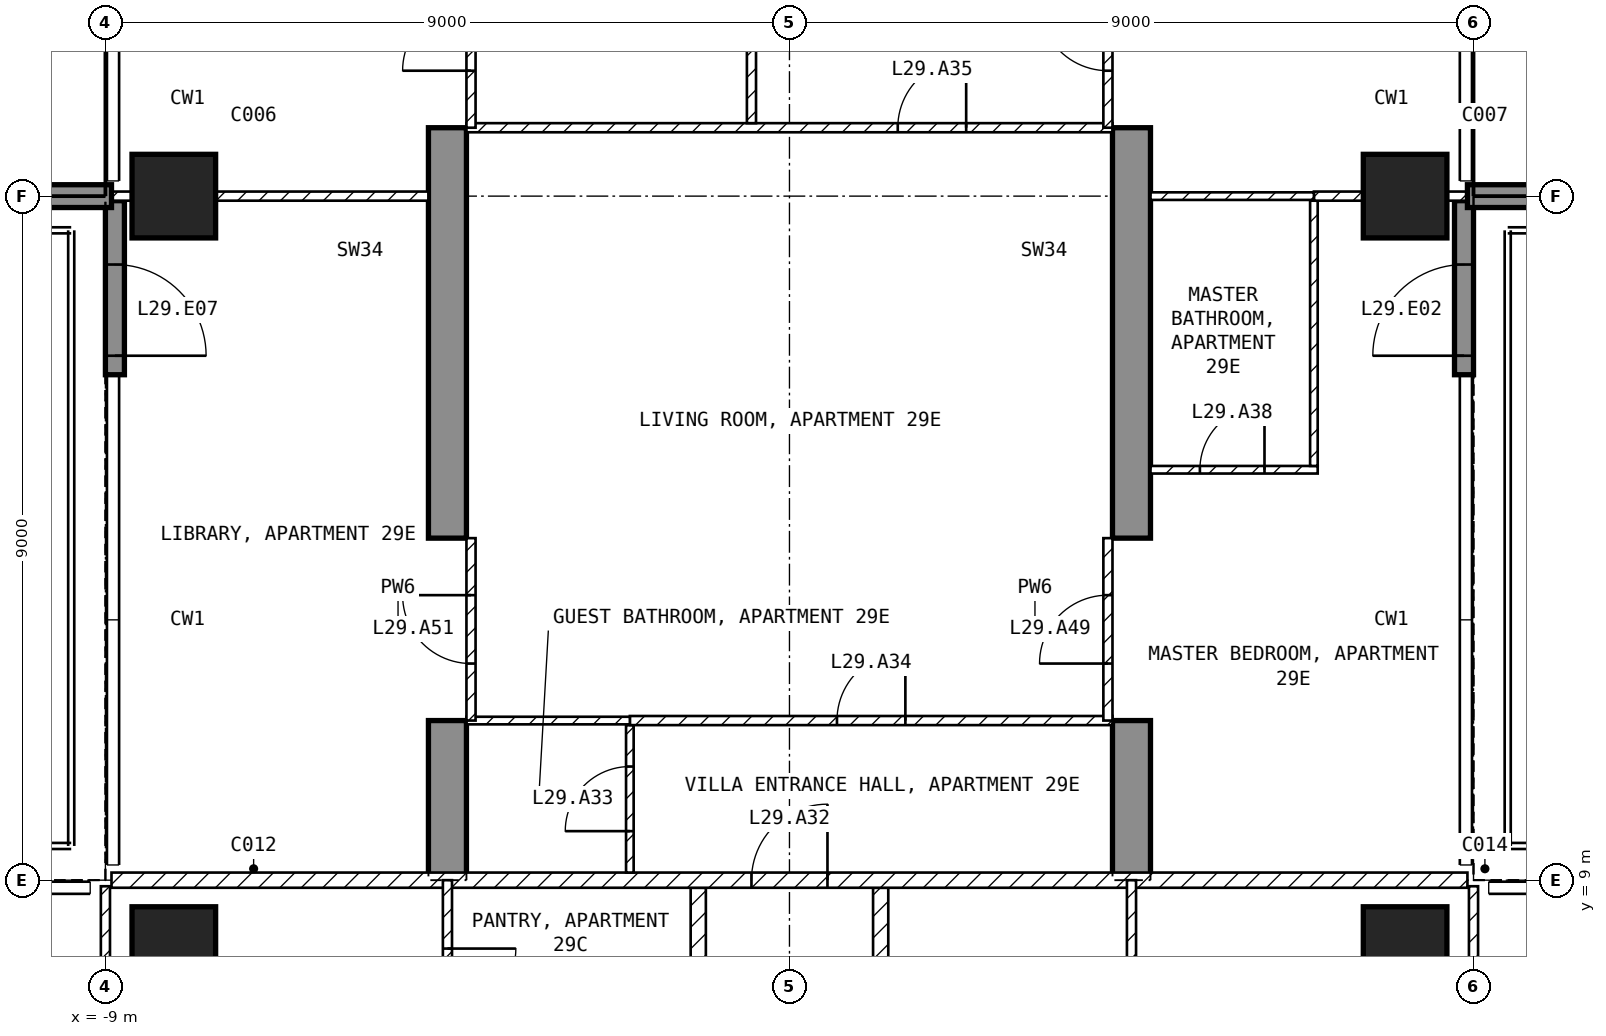
"""IFC4 building model, lengths in metres.
Left out: names, types, materials, properties, quantities, classifications, styles, units other than length and angle.
Written with IfcOpenShell. Run it as: python <this file> out.ifc"""

import sys

from ifc_helpers import new_model, si_unit, direction, frame, frame_2d, origin, origin_2d, place, context, subcontext, project, spatial, polyline, rectangle, outline, extrude, element, fill, save


model = new_model("IFC4")
c1 = context("Model", 3, precision=1e-05, world=origin(), true_north=direction((0.0, 1.0)))
c2 = subcontext(c1, "Body", "Model", "MODEL_VIEW")
j1 = project(units=[si_unit("LENGTHUNIT", "METRE"), si_unit("PLANEANGLEUNIT", "RADIAN")], contexts=[c1])
p1 = place(None, origin())
s1 = spatial("IfcSite", under=j1, at=p1, CompositionType="ELEMENT")
p2 = place(p1, origin())
s2 = spatial("IfcBuilding", under=s1, at=p2, CompositionType="ELEMENT")
p3 = place(p2, frame((0.0, 0.0, 123.4)))
s3 = spatial("IfcBuildingStorey", under=s2, at=p3, CompositionType="ELEMENT", Elevation=123.4)
for number, where, z_axis, x_axis in (
    (1, (-8.1, 8.1, -0.25), (0.0, 0.0, 1.0), (1.0, 0.0, 0.0)),
    (2, (-8.1, 18.0, -0.25), (0.0, 0.0, 1.0), (1.0, 0.0, 0.0)),
    (3, (8.1, 8.1, -0.25), (0.0, 0.0, 1.0), (1.0, 0.0, 0.0)),
    (4, (8.1, 18.0, -0.25), (0.0, 0.0, 1.0), (1.0, 0.0, 0.0)),
):
    element("IfcColumn", number, at=place(p3, frame(where, z_axis=z_axis, x_axis=x_axis)), inside=s3, PredefinedType="COLUMN", context=c2, shape_type="SweptSolid", body=[
        extrude(rectangle(XDim=1.1, YDim=1.1, at=origin_2d()), origin(), (0.0, 0.0, 1.0), 3.5),
    ])
for number, where, z_axis, x_axis in (
    (5, (-4.75, 9.0, -0.25), (1.0, 0.0, 0.0), (0.0, 1.0, 0.0)),
    (6, (4.25, 9.0, -0.25), (1.0, 0.0, 0.0), (0.0, 1.0, 0.0)),
):
    element("IfcWall", number, at=place(p3, frame(where, z_axis=z_axis, x_axis=x_axis)), inside=s3, PredefinedType="SHEAR", context=c2, shape_type="SweptSolid", body=[
        extrude(outline(polyline([(0.0, 0.0), (2.1, 0.0), (2.1, 2.65), (4.5, 2.65), (4.5, 0.0), (9.9, 0.0), (9.9, 2.65), (12.3, 2.65), (12.3, 0.0), (16.55, 0.0), (16.55, 3.5), (0.0, 3.5), (0.0, 0.0)])), origin(), (0.0, 0.0, 1.0), 0.5),
    ])
p4 = place(p3, frame((8.875, 15.65, 0.0), z_axis=(0.0, 0.0, 1.0), x_axis=(0.0, 1.0, 0.0)))
e7 = element("IfcWall", 7, at=p4, inside=s3, PredefinedType="SOLIDWALL", context=c2, shape_type="SweptSolid", body=[
    extrude(rectangle(XDim=2.29, YDim=0.25, at=frame_2d((1.145, 0.0))), origin(), (0.0, 0.0, 1.0), 3.25),
])
p5 = place(p4, frame((0.25, 0.0, 0.0)))
e8 = element("IfcOpeningElement", 8, at=p5, cuts=e7, PredefinedType="OPENING", context=c2, shape_type="SweptSolid", body=[
    extrude(rectangle(XDim=1.2, YDim=2.4, at=frame_2d((0.6, 1.2))), frame((0.0, 0.135, 0.0), z_axis=(0.0, -1.0, 0.0), x_axis=(1.0, 0.0, 0.0)), (0.0, 0.0, 1.0), 0.27),
])
p6 = place(p3, frame((-8.875, 17.94, 0.0), z_axis=(0.0, 0.0, 1.0), x_axis=(0.0, -1.0, 0.0)))
e9 = element("IfcWall", 9, at=p6, inside=s3, PredefinedType="SOLIDWALL", context=c2, shape_type="SweptSolid", body=[
    extrude(rectangle(XDim=2.29, YDim=0.25, at=frame_2d((1.145, 0.0))), origin(), (0.0, 0.0, 1.0), 3.25),
])
p7 = place(p6, frame((0.84, 0.0, 0.0)))
e10 = element("IfcOpeningElement", 10, at=p7, cuts=e9, PredefinedType="OPENING", context=c2, shape_type="SweptSolid", body=[
    extrude(rectangle(XDim=1.2, YDim=2.4, at=frame_2d((0.6, 1.2))), frame((0.0, 0.135, 0.0), z_axis=(0.0, -1.0, 0.0), x_axis=(1.0, 0.0, 0.0)), (0.0, 0.0, 1.0), 0.27),
])
for number, where, z_axis, x_axis in (
    (11, (-8.92, 18.0, 0.0), (0.0, 0.0, 1.0), (-1.0, 0.0, 0.0)),
    (12, (8.92, 18.0, 0.0), (0.0, 0.0, 1.0), (1.0, 0.0, 0.0)),
):
    element("IfcWall", number, at=place(p3, frame(where, z_axis=z_axis, x_axis=x_axis)), inside=s3, PredefinedType="SOLIDWALL", context=c2, shape_type="SweptSolid", body=[
        extrude(rectangle(XDim=2.82, YDim=0.3, at=frame_2d((1.41, 0.0))), origin(), (0.0, 0.0, 1.0), 3.25),
    ])
for number, where, z_axis, x_axis in (
    (13, (1.2, 8.9, 0.0), (0.0, 0.0, 1.0), (0.0, -1.0, 0.0)),
    (14, (-1.2, 4.6, 0.0), (0.0, 0.0, 1.0), (0.0, 1.0, 0.0)),
):
    element("IfcWall", number, at=place(p3, frame(where, z_axis=z_axis, x_axis=x_axis)), inside=s3, PredefinedType="PARTITIONING", context=c2, shape_type="SweptSolid", body=[
        extrude(rectangle(XDim=4.3, YDim=0.2, at=frame_2d((2.15, 0.0))), origin(), (0.0, 0.0, 1.0), 3.25),
    ])
p8 = place(p3, frame((-8.92, 9.0, 0.0), z_axis=(0.0, 0.0, 1.0), x_axis=(1.0, 0.0, 0.0)))
e15 = element("IfcWall", 15, at=p8, inside=s3, PredefinedType="PARTITIONING", context=c2, shape_type="SweptSolid", body=[
    extrude(rectangle(XDim=17.84, YDim=0.2, at=frame_2d((8.92, 0.0))), origin(), (0.0, 0.0, 1.0), 3.25),
])
p9 = place(p8, frame((8.42, 0.0, 0.0)))
e16 = element("IfcOpeningElement", 16, at=p9, cuts=e15, PredefinedType="OPENING", context=c2, shape_type="SweptSolid", body=[
    extrude(rectangle(XDim=1.0, YDim=2.1, at=frame_2d((0.5, 1.05))), frame((0.0, 0.11, 0.0), z_axis=(0.0, -1.0, 0.0), x_axis=(1.0, 0.0, 0.0)), (0.0, 0.0, 1.0), 0.22),
])
p10 = place(p3, frame((9.0, 1.3, 0.0), z_axis=(0.0, 0.0, 1.0), x_axis=(0.0, 1.0, 0.0)))
e17 = element("IfcWall", 17, at=p10, inside=s3, PredefinedType="PARTITIONING", context=c2, shape_type="SweptSolid", body=[
    extrude(rectangle(XDim=7.62, YDim=0.12, at=frame_2d((3.81, 0.0))), origin(), (0.0, 0.0, 1.0), 3.25),
])
p11 = place(p10, frame((3.29, 0.0, 0.0)))
e18 = element("IfcOpeningElement", 18, at=p11, cuts=e17, PredefinedType="OPENING", context=c2, shape_type="SweptSolid", body=[
    extrude(rectangle(XDim=0.9, YDim=2.1, at=frame_2d((0.45, 1.05))), frame((0.0, 0.07, 0.0), z_axis=(0.0, -1.0, 0.0), x_axis=(1.0, 0.0, 0.0)), (0.0, 0.0, 1.0), 0.14),
])
p12 = place(p10, frame((4.65, 0.0, 0.0)))
e19 = element("IfcOpeningElement", 19, at=p12, cuts=e17, PredefinedType="OPENING", context=c2, shape_type="SweptSolid", body=[
    extrude(rectangle(XDim=0.9, YDim=2.1, at=frame_2d((0.45, 1.05))), frame((0.0, 0.07, 0.0), z_axis=(0.0, -1.0, 0.0), x_axis=(1.0, 0.0, 0.0)), (0.0, 0.0, 1.0), 0.14),
])
p13 = place(p3, frame((4.5, 4.5, 0.0), z_axis=(0.0, 0.0, 1.0), x_axis=(0.0, 1.0, 0.0)))
e20 = element("IfcWall", 20, at=p13, inside=s3, PredefinedType="PARTITIONING", context=c2, shape_type="SweptSolid", body=[
    extrude(rectangle(XDim=4.5, YDim=0.12, at=frame_2d((2.25, 0.0))), origin(), (0.0, 0.0, 1.0), 3.25),
])
p14 = place(p13, frame((0.24, 0.0, 0.0)))
e21 = element("IfcOpeningElement", 21, at=p14, cuts=e20, PredefinedType="OPENING", context=c2, shape_type="SweptSolid", body=[
    extrude(rectangle(XDim=0.9, YDim=2.1, at=frame_2d((0.45, 1.05))), frame((0.0, 0.07, 0.0), z_axis=(0.0, -1.0, 0.0), x_axis=(1.0, 0.0, 0.0)), (0.0, 0.0, 1.0), 0.14),
])
p15 = place(p3, frame((-9.0, 8.92, 0.0), z_axis=(0.0, 0.0, 1.0), x_axis=(0.0, -1.0, 0.0)))
e22 = element("IfcWall", 22, at=p15, inside=s3, PredefinedType="PARTITIONING", context=c2, shape_type="SweptSolid", body=[
    extrude(rectangle(XDim=7.62, YDim=0.12, at=frame_2d((3.81, 0.0))), origin(), (0.0, 0.0, 1.0), 3.25),
])
p16 = place(p15, frame((6.32, 0.0, 0.0)))
e23 = element("IfcOpeningElement", 23, at=p16, cuts=e22, PredefinedType="OPENING", context=c2, shape_type="SweptSolid", body=[
    extrude(rectangle(XDim=0.9, YDim=2.1, at=frame_2d((0.45, 1.05))), frame((0.0, 0.07, 0.0), z_axis=(0.0, -1.0, 0.0), x_axis=(1.0, 0.0, 0.0)), (0.0, 0.0, 1.0), 0.14),
])
p17 = place(p3, frame((-4.5, 9.0, 0.0), z_axis=(0.0, 0.0, 1.0), x_axis=(0.0, -1.0, 0.0)))
e24 = element("IfcWall", 24, at=p17, inside=s3, PredefinedType="PARTITIONING", context=c2, shape_type="SweptSolid", body=[
    extrude(rectangle(XDim=2.7, YDim=0.12, at=frame_2d((1.35, 0.0))), origin(), (0.0, 0.0, 1.0), 3.25),
])
p18 = place(p17, frame((0.9, 0.0, 0.0)))
e25 = element("IfcOpeningElement", 25, at=p18, cuts=e24, PredefinedType="OPENING", context=c2, shape_type="SweptSolid", body=[
    extrude(rectangle(XDim=0.9, YDim=2.1, at=frame_2d((0.45, 1.05))), frame((0.0, 0.07, 0.0), z_axis=(0.0, -1.0, 0.0), x_axis=(1.0, 0.0, 0.0)), (0.0, 0.0, 1.0), 0.14),
])
p19 = place(p3, frame((-2.1, 9.1, 0.0), z_axis=(0.0, 0.0, 1.0), x_axis=(0.0, 1.0, 0.0)))
e26 = element("IfcWall", 26, at=p19, inside=s3, PredefinedType="PARTITIONING", context=c2, shape_type="SweptSolid", body=[
    extrude(rectangle(XDim=1.94, YDim=0.1, at=frame_2d((0.97, 0.0))), origin(), (0.0, 0.0, 1.0), 3.25),
])
p20 = place(p19, frame((0.545, 0.0, 0.0)))
e27 = element("IfcOpeningElement", 27, at=p20, cuts=e26, PredefinedType="OPENING", context=c2, shape_type="SweptSolid", body=[
    extrude(rectangle(XDim=0.85, YDim=2.1, at=frame_2d((0.425, 1.05))), frame((0.0, 0.06, 0.0), z_axis=(0.0, -1.0, 0.0), x_axis=(1.0, 0.0, 0.0)), (0.0, 0.0, 1.0), 0.12),
])
p21 = place(p3, frame((-2.1, 11.1, 0.0), z_axis=(0.0, 0.0, 1.0), x_axis=(1.0, 0.0, 0.0)))
e28 = element("IfcWall", 28, at=p21, inside=s3, PredefinedType="PARTITIONING", context=c2, shape_type="SweptSolid", body=[
    extrude(rectangle(XDim=6.35, YDim=0.12, at=frame_2d((3.175, 0.0))), origin(), (0.0, 0.0, 1.0), 3.25),
])
p22 = place(p21, frame((2.725, 0.0, 0.0)))
e29 = element("IfcOpeningElement", 29, at=p22, cuts=e28, PredefinedType="OPENING", context=c2, shape_type="SweptSolid", body=[
    extrude(rectangle(XDim=0.9, YDim=2.1, at=frame_2d((0.45, 1.05))), frame((0.0, 0.07, 0.0), z_axis=(0.0, -1.0, 0.0), x_axis=(1.0, 0.0, 0.0)), (0.0, 0.0, 1.0), 0.14),
])
p23 = place(p3, frame((-4.25, 11.1, 0.0), z_axis=(0.0, 0.0, 1.0), x_axis=(1.0, 0.0, 0.0)))
e30 = element("IfcWall", 30, at=p23, inside=s3, PredefinedType="PARTITIONING", context=c2, shape_type="SweptSolid", body=[
    extrude(rectangle(XDim=2.15, YDim=0.1, at=frame_2d((1.075, 0.0))), origin(), (0.0, 0.0, 1.0), 3.25),
])
p24 = place(p3, frame((-4.25, 18.9, 0.0), z_axis=(0.0, 0.0, 1.0), x_axis=(1.0, 0.0, 0.0)))
e31 = element("IfcWall", 31, at=p24, inside=s3, PredefinedType="PARTITIONING", context=c2, shape_type="SweptSolid", body=[
    extrude(rectangle(XDim=8.5, YDim=0.12, at=frame_2d((4.25, 0.0))), origin(), (0.0, 0.0, 1.0), 3.25),
])
p25 = place(p24, frame((5.675, 0.0, 0.0)))
e32 = element("IfcOpeningElement", 32, at=p25, cuts=e31, PredefinedType="OPENING", context=c2, shape_type="SweptSolid", body=[
    extrude(rectangle(XDim=0.9, YDim=2.1, at=frame_2d((0.45, 1.05))), frame((0.0, 0.07, 0.0), z_axis=(0.0, -1.0, 0.0), x_axis=(1.0, 0.0, 0.0)), (0.0, 0.0, 1.0), 0.14),
])
p26 = place(p3, frame((-0.5, 18.96, 0.0), z_axis=(0.0, 0.0, 1.0), x_axis=(0.0, 1.0, 0.0)))
e33 = element("IfcWall", 33, at=p26, inside=s3, PredefinedType="PARTITIONING", context=c2, shape_type="SweptSolid", body=[
    extrude(rectangle(XDim=4.38, YDim=0.12, at=frame_2d((2.19, 0.0))), origin(), (0.0, 0.0, 1.0), 3.25),
])
p27 = place(p26, frame((1.74, 0.0, 0.0)))
e34 = element("IfcOpeningElement", 34, at=p27, cuts=e33, PredefinedType="OPENING", context=c2, shape_type="SweptSolid", body=[
    extrude(rectangle(XDim=0.9, YDim=2.1, at=frame_2d((0.45, 1.05))), frame((0.0, 0.07, 0.0), z_axis=(0.0, -1.0, 0.0), x_axis=(1.0, 0.0, 0.0)), (0.0, 0.0, 1.0), 0.14),
])
p28 = place(p3, frame((4.75, 14.4, 0.0), z_axis=(0.0, 0.0, 1.0), x_axis=(1.0, 0.0, 0.0)))
e35 = element("IfcWall", 35, at=p28, inside=s3, PredefinedType="PARTITIONING", context=c2, shape_type="SweptSolid", body=[
    extrude(rectangle(XDim=2.2, YDim=0.1, at=frame_2d((1.1, 0.0))), origin(), (0.0, 0.0, 1.0), 3.25),
])
p29 = place(p28, frame((0.65, 0.0, 0.0)))
e36 = element("IfcOpeningElement", 36, at=p29, cuts=e35, PredefinedType="OPENING", context=c2, shape_type="SweptSolid", body=[
    extrude(rectangle(XDim=0.85, YDim=2.1, at=frame_2d((0.425, 1.05))), frame((0.0, 0.06, 0.0), z_axis=(0.0, -1.0, 0.0), x_axis=(1.0, 0.0, 0.0)), (0.0, 0.0, 1.0), 0.12),
])
p30 = place(p3, frame((6.9, 14.45, 0.0), z_axis=(0.0, 0.0, 1.0), x_axis=(0.0, 1.0, 0.0)))
e37 = element("IfcWall", 37, at=p30, inside=s3, PredefinedType="PARTITIONING", context=c2, shape_type="SweptSolid", body=[
    extrude(rectangle(XDim=3.49, YDim=0.1, at=frame_2d((1.745, 0.0))), origin(), (0.0, 0.0, 1.0), 3.25),
])
p31 = place(p3, frame((6.9, 18.0, 0.0), z_axis=(0.0, 0.0, 1.0), x_axis=(1.0, 0.0, 0.0)))
e38 = element("IfcWall", 38, at=p31, inside=s3, PredefinedType="PARTITIONING", context=c2, shape_type="SweptSolid", body=[
    extrude(rectangle(XDim=2.02, YDim=0.12, at=frame_2d((1.01, 0.0))), origin(), (0.0, 0.0, 1.0), 2.414),
])
p32 = place(p3, frame((4.75, 18.0, 0.0), z_axis=(0.0, 0.0, 1.0), x_axis=(1.0, 0.0, 0.0)))
e39 = element("IfcWall", 39, at=p32, inside=s3, PredefinedType="PARTITIONING", context=c2, shape_type="SweptSolid", body=[
    extrude(rectangle(XDim=2.15, YDim=0.1, at=frame_2d((1.075, 0.0))), origin(), (0.0, 0.0, 1.0), 2.414),
])
p33 = place(p3, frame((-8.92, 18.0, 0.0), z_axis=(0.0, 0.0, 1.0), x_axis=(1.0, 0.0, 0.0)))
e40 = element("IfcWall", 40, at=p33, inside=s3, PredefinedType="PARTITIONING", context=c2, shape_type="SweptSolid", body=[
    extrude(rectangle(XDim=4.17, YDim=0.12, at=frame_2d((2.085, 0.0))), origin(), (0.0, 0.0, 1.0), 2.414),
])
p34 = place(p3, frame((4.19, 11.1, 0.0), z_axis=(0.0, 0.0, 1.0), x_axis=(0.0, 1.0, 0.0)))
e41 = element("IfcWall", 41, at=p34, inside=s3, PredefinedType="PARTITIONING", context=c2, shape_type="SweptSolid", body=[
    extrude(rectangle(XDim=2.4, YDim=0.12, at=frame_2d((1.2, 0.0))), origin(), (0.0, 0.0, 1.0), 2.4),
])
p35 = place(p34, frame((0.75, 0.0, 0.0)))
e42 = element("IfcOpeningElement", 42, at=p35, cuts=e41, PredefinedType="OPENING", context=c2, shape_type="SweptSolid", body=[
    extrude(rectangle(XDim=0.9, YDim=2.1, at=frame_2d((0.45, 1.05))), frame((0.0, 0.07, 0.0), z_axis=(0.0, -1.0, 0.0), x_axis=(1.0, 0.0, 0.0)), (0.0, 0.0, 1.0), 0.14),
])
p36 = place(p3, frame((4.19, 18.9, 0.0), z_axis=(0.0, 0.0, 1.0), x_axis=(0.0, 1.0, 0.0)))
e43 = element("IfcWall", 43, at=p36, inside=s3, PredefinedType="PARTITIONING", context=c2, shape_type="SweptSolid", body=[
    extrude(rectangle(XDim=2.4, YDim=0.12, at=frame_2d((1.2, 0.0))), origin(), (0.0, 0.0, 1.0), 2.4),
])
p37 = place(p36, frame((0.75, 0.0, 0.0)))
e44 = element("IfcOpeningElement", 44, at=p37, cuts=e43, PredefinedType="OPENING", context=c2, shape_type="SweptSolid", body=[
    extrude(rectangle(XDim=0.9, YDim=2.1, at=frame_2d((0.45, 1.05))), frame((0.0, 0.07, 0.0), z_axis=(0.0, -1.0, 0.0), x_axis=(1.0, 0.0, 0.0)), (0.0, 0.0, 1.0), 0.14),
])
p38 = place(p3, frame((-4.19, 11.1, 0.0), z_axis=(0.0, 0.0, 1.0), x_axis=(0.0, 1.0, 0.0)))
e45 = element("IfcWall", 45, at=p38, inside=s3, PredefinedType="PARTITIONING", context=c2, shape_type="SweptSolid", body=[
    extrude(rectangle(XDim=2.4, YDim=0.12, at=frame_2d((1.2, 0.0))), origin(), (0.0, 0.0, 1.0), 2.4),
])
p39 = place(p38, frame((0.75, 0.0, 0.0)))
e46 = element("IfcOpeningElement", 46, at=p39, cuts=e45, PredefinedType="OPENING", context=c2, shape_type="SweptSolid", body=[
    extrude(rectangle(XDim=0.9, YDim=2.1, at=frame_2d((0.45, 1.05))), frame((0.0, 0.07, 0.0), z_axis=(0.0, -1.0, 0.0), x_axis=(1.0, 0.0, 0.0)), (0.0, 0.0, 1.0), 0.14),
])
p40 = place(p3, frame((-4.19, 18.9, 0.0), z_axis=(0.0, 0.0, 1.0), x_axis=(0.0, 1.0, 0.0)))
e47 = element("IfcWall", 47, at=p40, inside=s3, PredefinedType="PARTITIONING", context=c2, shape_type="SweptSolid", body=[
    extrude(rectangle(XDim=2.4, YDim=0.12, at=frame_2d((1.2, 0.0))), origin(), (0.0, 0.0, 1.0), 2.4),
])
p41 = place(p40, frame((0.75, 0.0, 0.0)))
e48 = element("IfcOpeningElement", 48, at=p41, cuts=e47, PredefinedType="OPENING", context=c2, shape_type="SweptSolid", body=[
    extrude(rectangle(XDim=0.9, YDim=2.1, at=frame_2d((0.45, 1.05))), frame((0.0, 0.07, 0.0), z_axis=(0.0, -1.0, 0.0), x_axis=(1.0, 0.0, 0.0)), (0.0, 0.0, 1.0), 0.14),
])
p42 = place(p5, origin())
e49 = element("IfcDoor", 49, at=p42, inside=s3, OperationType="SINGLE_SWING_LEFT", PredefinedType="DOOR", context=c2, shape_type="SweptSolid", body=[
    extrude(rectangle(XDim=1.2, YDim=2.4, at=frame_2d((0.6, 1.2))), frame((0.0, 0.025, 0.0), z_axis=(0.0, -1.0, 0.0), x_axis=(1.0, 0.0, 0.0)), (0.0, 0.0, 1.0), 0.05),
])
fill(e8, e49)
p43 = place(p7, origin())
e50 = element("IfcDoor", 50, at=p43, inside=s3, OperationType="SINGLE_SWING_RIGHT", PredefinedType="DOOR", context=c2, shape_type="SweptSolid", body=[
    extrude(rectangle(XDim=1.2, YDim=2.4, at=frame_2d((0.6, 1.2))), frame((0.0, 0.025, 0.0), z_axis=(0.0, -1.0, 0.0), x_axis=(1.0, 0.0, 0.0)), (0.0, 0.0, 1.0), 0.05),
])
fill(e10, e50)
p44 = place(p18, origin())
e51 = element("IfcDoor", 51, at=p44, inside=s3, OperationType="SINGLE_SWING_LEFT", PredefinedType="DOOR", context=c2, shape_type="SweptSolid", body=[
    extrude(rectangle(XDim=0.9, YDim=2.1, at=frame_2d((0.45, 1.05))), frame((0.0, 0.025, 0.0), z_axis=(0.0, -1.0, 0.0), x_axis=(1.0, 0.0, 0.0)), (0.0, 0.0, 1.0), 0.05),
])
fill(e25, e51)
p45 = place(p9, origin())
e52 = element("IfcDoor", 52, at=p45, inside=s3, OperationType="SINGLE_SWING_RIGHT", PredefinedType="DOOR", context=c2, shape_type="SweptSolid", body=[
    extrude(rectangle(XDim=1.0, YDim=2.1, at=frame_2d((0.5, 1.05))), frame((0.0, 0.025, 0.0), z_axis=(0.0, -1.0, 0.0), x_axis=(1.0, 0.0, 0.0)), (0.0, 0.0, 1.0), 0.05),
])
fill(e16, e52)
p46 = place(p20, origin())
e53 = element("IfcDoor", 53, at=p46, inside=s3, OperationType="SINGLE_SWING_LEFT", PredefinedType="DOOR", context=c2, shape_type="SweptSolid", body=[
    extrude(rectangle(XDim=0.85, YDim=2.1, at=frame_2d((0.425, 1.05))), frame((0.0, 0.025, 0.0), z_axis=(0.0, -1.0, 0.0), x_axis=(1.0, 0.0, 0.0)), (0.0, 0.0, 1.0), 0.05),
])
fill(e27, e53)
p47 = place(p22, origin())
e54 = element("IfcDoor", 54, at=p47, inside=s3, OperationType="SINGLE_SWING_RIGHT", PredefinedType="DOOR", context=c2, shape_type="SweptSolid", body=[
    extrude(rectangle(XDim=0.9, YDim=2.1, at=frame_2d((0.45, 1.05))), frame((0.0, 0.025, 0.0), z_axis=(0.0, -1.0, 0.0), x_axis=(1.0, 0.0, 0.0)), (0.0, 0.0, 1.0), 0.05),
])
fill(e29, e54)
p48 = place(p25, origin())
e55 = element("IfcDoor", 55, at=p48, inside=s3, OperationType="SINGLE_SWING_RIGHT", PredefinedType="DOOR", context=c2, shape_type="SweptSolid", body=[
    extrude(rectangle(XDim=0.9, YDim=2.1, at=frame_2d((0.45, 1.05))), frame((0.0, 0.025, 0.0), z_axis=(0.0, -1.0, 0.0), x_axis=(1.0, 0.0, 0.0)), (0.0, 0.0, 1.0), 0.05),
])
fill(e32, e55)
p49 = place(p29, origin())
e56 = element("IfcDoor", 56, at=p49, inside=s3, OperationType="SINGLE_SWING_RIGHT", PredefinedType="DOOR", context=c2, shape_type="SweptSolid", body=[
    extrude(rectangle(XDim=0.85, YDim=2.1, at=frame_2d((0.425, 1.05))), frame((0.0, 0.025, 0.0), z_axis=(0.0, -1.0, 0.0), x_axis=(1.0, 0.0, 0.0)), (0.0, 0.0, 1.0), 0.05),
])
fill(e36, e56)
p50 = place(p35, origin())
e57 = element("IfcDoor", 57, at=p50, inside=s3, OperationType="SINGLE_SWING_LEFT", PredefinedType="DOOR", context=c2, shape_type="SweptSolid", body=[
    extrude(rectangle(XDim=0.9, YDim=2.1, at=frame_2d((0.45, 1.05))), frame((0.0, 0.025, 0.0), z_axis=(0.0, -1.0, 0.0), x_axis=(1.0, 0.0, 0.0)), (0.0, 0.0, 1.0), 0.05),
])
fill(e42, e57)
p51 = place(p37, origin())
e58 = element("IfcDoor", 58, at=p51, inside=s3, OperationType="SINGLE_SWING_RIGHT", PredefinedType="DOOR", context=c2, shape_type="SweptSolid", body=[
    extrude(rectangle(XDim=0.9, YDim=2.1, at=frame_2d((0.45, 1.05))), frame((0.0, 0.025, 0.0), z_axis=(0.0, -1.0, 0.0), x_axis=(1.0, 0.0, 0.0)), (0.0, 0.0, 1.0), 0.05),
])
fill(e44, e58)
p52 = place(p39, origin())
e59 = element("IfcDoor", 59, at=p52, inside=s3, OperationType="SINGLE_SWING_RIGHT", PredefinedType="DOOR", context=c2, shape_type="SweptSolid", body=[
    extrude(rectangle(XDim=0.9, YDim=2.1, at=frame_2d((0.45, 1.05))), frame((0.0, 0.025, 0.0), z_axis=(0.0, -1.0, 0.0), x_axis=(1.0, 0.0, 0.0)), (0.0, 0.0, 1.0), 0.05),
])
fill(e46, e59)
p53 = place(p41, origin())
e60 = element("IfcDoor", 60, at=p53, inside=s3, OperationType="SINGLE_SWING_LEFT", PredefinedType="DOOR", context=c2, shape_type="SweptSolid", body=[
    extrude(rectangle(XDim=0.9, YDim=2.1, at=frame_2d((0.45, 1.05))), frame((0.0, 0.025, 0.0), z_axis=(0.0, -1.0, 0.0), x_axis=(1.0, 0.0, 0.0)), (0.0, 0.0, 1.0), 0.05),
])
fill(e48, e60)
save(model, sys.argv[1])
